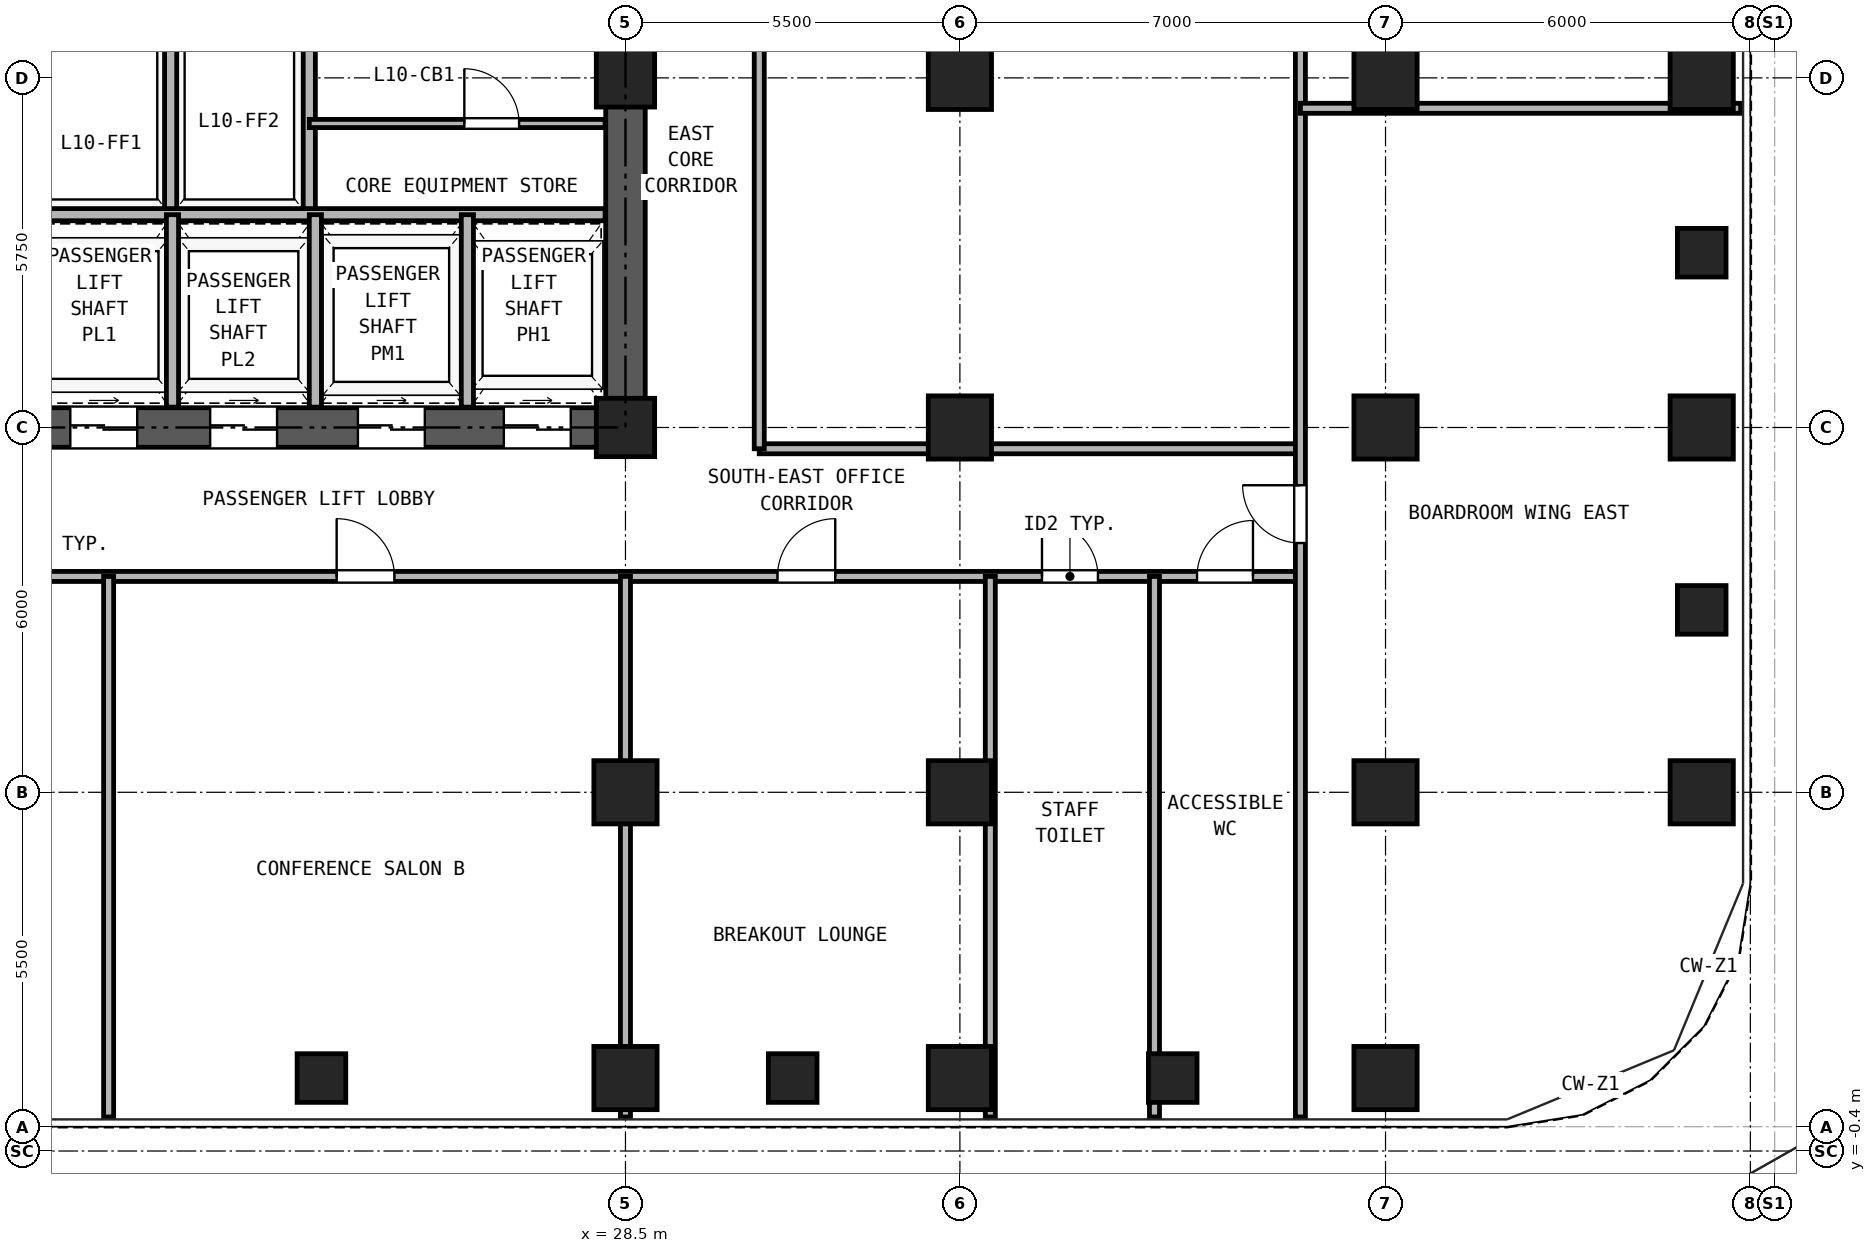
"""IFC4 building model, lengths in metres.
Left out: names, types, materials, properties, quantities, classifications, styles, units other than length and angle.
Written with IfcOpenShell. Run it as: python <this file> out.ifc"""

import sys

from ifc_helpers import new_model, si_unit, direction, frame, frame_2d, origin, origin_2d, place, context, subcontext, project, spatial, rectangle, hollow_rectangle, extrude, source, transform, mapped, element, fill, save


model = new_model("IFC4")
c1 = context("Model", 3, precision=1e-05, world=origin(), true_north=direction((0.0, 1.0)))
c2 = subcontext(c1, "Body", "Model", "MODEL_VIEW")
j1 = project(units=[si_unit("LENGTHUNIT", "METRE"), si_unit("PLANEANGLEUNIT", "RADIAN")], contexts=[c1])
p1 = place(None, origin())
s1 = spatial("IfcSite", under=j1, at=p1, CompositionType="ELEMENT")
p2 = place(p1, origin())
s2 = spatial("IfcBuilding", under=s1, at=p2, CompositionType="ELEMENT")
p3 = place(p2, frame((0.0, 0.0, 40.5)))
s3 = spatial("IfcBuildingStorey", under=s2, at=p3, CompositionType="ELEMENT", Elevation=40.5)
m1 = source(origin(), c2, "Body", "SweptSolid", [
    extrude(hollow_rectangle(XDim=1.04, YDim=1.04, WallThickness=0.065, at=origin_2d()), origin(), (0.0, 0.0, 1.0), 3.32),
])
for number, where, z_axis, x_axis in (
    (1, (28.5, 0.8, 0.0), (0.0, 0.0, 1.0), (1.0, 0.0, 0.0)),
    (2, (34.0, 0.8, 0.0), (0.0, 0.0, 1.0), (1.0, 0.0, 0.0)),
    (3, (41.0, 0.8, 0.0), (0.0, 0.0, 1.0), (1.0, 0.0, 0.0)),
    (4, (46.2, 5.5, 0.0), (0.0, 0.0, 1.0), (1.0, 0.0, 0.0)),
    (5, (46.2, 11.5, 0.0), (0.0, 0.0, 1.0), (1.0, 0.0, 0.0)),
    (6, (46.2, 17.25, 0.0), (0.0, 0.0, 1.0), (1.0, 0.0, 0.0)),
    (7, (28.5, 5.5, 0.0), (0.0, 0.0, 1.0), (1.0, 0.0, 0.0)),
):
    element("IfcColumn", number, at=place(p3, frame(where, z_axis=z_axis, x_axis=x_axis)), inside=s3, PredefinedType="COLUMN", context=c2, shape_type="MappedRepresentation", body=[
        mapped(m1, transform((0.0, 0.0, 0.0), x_axis=(1.0, 0.0, 0.0), y_axis=(0.0, 1.0, 0.0), z_axis=(0.0, 0.0, 1.0), scale=1.0)),
    ])
m2 = source(origin(), c2, "Body", "SweptSolid", [
    extrude(hollow_rectangle(XDim=0.96, YDim=0.96, WallThickness=0.06, at=origin_2d()), origin(), (0.0, 0.0, 1.0), 3.32),
])
for number, where, z_axis, x_axis in (
    (8, (28.5, 11.5, 0.0), (0.0, 0.0, 1.0), (1.0, 0.0, 0.0)),
    (9, (28.5, 17.25, 0.0), (0.0, 0.0, 1.0), (1.0, 0.0, 0.0)),
):
    element("IfcColumn", number, at=place(p3, frame(where, z_axis=z_axis, x_axis=x_axis)), inside=s3, PredefinedType="COLUMN", context=c2, shape_type="MappedRepresentation", body=[
        mapped(m2, transform((0.0, 0.0, 0.0), x_axis=(1.0, 0.0, 0.0), y_axis=(0.0, 1.0, 0.0), z_axis=(0.0, 0.0, 1.0), scale=1.0)),
    ])
for number, where, z_axis, x_axis in (
    (10, (34.0, 5.5, 0.0), (0.0, 0.0, 1.0), (1.0, 0.0, 0.0)),
    (11, (34.0, 11.5, 0.0), (0.0, 0.0, 1.0), (1.0, 0.0, 0.0)),
    (12, (34.0, 17.25, 0.0), (0.0, 0.0, 1.0), (1.0, 0.0, 0.0)),
    (13, (41.0, 5.5, 0.0), (0.0, 0.0, 1.0), (1.0, 0.0, 0.0)),
    (14, (41.0, 11.5, 0.0), (0.0, 0.0, 1.0), (1.0, 0.0, 0.0)),
    (15, (41.0, 17.25, 0.0), (0.0, 0.0, 1.0), (1.0, 0.0, 0.0)),
):
    element("IfcColumn", number, at=place(p3, frame(where, z_axis=z_axis, x_axis=x_axis)), inside=s3, PredefinedType="COLUMN", context=c2, shape_type="MappedRepresentation", body=[
        mapped(m1, transform((0.0, 0.0, 0.0), x_axis=(1.0, 0.0, 0.0), y_axis=(0.0, 1.0, 0.0), z_axis=(0.0, 0.0, 1.0), scale=1.0)),
    ])
m3 = source(origin(), c2, "Body", "SweptSolid", [
    extrude(hollow_rectangle(XDim=0.8, YDim=0.8, WallThickness=0.045, at=origin_2d()), origin(), (0.0, 0.0, 1.0), 3.32),
])
for number, where, z_axis, x_axis in (
    (16, (23.5, 0.8, 0.0), (0.0, 0.0, 1.0), (1.0, 0.0, 0.0)),
    (17, (31.25, 0.8, 0.0), (0.0, 0.0, 1.0), (1.0, 0.0, 0.0)),
    (18, (37.5, 0.8, 0.0), (0.0, 0.0, 1.0), (1.0, 0.0, 0.0)),
    (19, (46.2, 8.5, 0.0), (0.0, 0.0, 1.0), (1.0, 0.0, 0.0)),
    (20, (46.2, 14.375, 0.0), (0.0, 0.0, 1.0), (1.0, 0.0, 0.0)),
):
    element("IfcColumn", number, at=place(p3, frame(where, z_axis=z_axis, x_axis=x_axis)), inside=s3, PredefinedType="COLUMN", context=c2, shape_type="MappedRepresentation", body=[
        mapped(m3, transform((0.0, 0.0, 0.0), x_axis=(1.0, 0.0, 0.0), y_axis=(0.0, 1.0, 0.0), z_axis=(0.0, 0.0, 1.0), scale=1.0)),
    ])
p4 = place(p3, frame((18.175, 11.5, 0.0), z_axis=(0.0, 0.0, 1.0), x_axis=(1.0, 0.0, 0.0)))
e21 = element("IfcWall", 21, at=p4, inside=s3, PredefinedType="SHEAR", context=c2, shape_type="SweptSolid", body=[
    extrude(rectangle(XDim=10.65, YDim=0.65, at=frame_2d((5.325, 0.0))), origin(), (0.0, 0.0, 1.0), 3.32),
])
p5 = place(p4, frame((1.195, 0.0, 0.0)))
e22 = element("IfcOpeningElement", 22, at=p5, cuts=e21, PredefinedType="OPENING", context=c2, shape_type="SweptSolid", body=[
    extrude(rectangle(XDim=1.1, YDim=2.25, at=frame_2d((0.55, 1.125))), frame((0.0, 0.335, 0.0), z_axis=(0.0, -1.0, 0.0), x_axis=(1.0, 0.0, 0.0)), (0.0, 0.0, 1.0), 0.67),
])
p6 = place(p4, frame((3.495, 0.0, 0.0)))
e23 = element("IfcOpeningElement", 23, at=p6, cuts=e21, PredefinedType="OPENING", context=c2, shape_type="SweptSolid", body=[
    extrude(rectangle(XDim=1.1, YDim=2.25, at=frame_2d((0.55, 1.125))), frame((0.0, 0.335, 0.0), z_axis=(0.0, -1.0, 0.0), x_axis=(1.0, 0.0, 0.0)), (0.0, 0.0, 1.0), 0.67),
])
p7 = place(p4, frame((5.925, 0.0, 0.0)))
e24 = element("IfcOpeningElement", 24, at=p7, cuts=e21, PredefinedType="OPENING", context=c2, shape_type="SweptSolid", body=[
    extrude(rectangle(XDim=1.1, YDim=2.25, at=frame_2d((0.55, 1.125))), frame((0.0, 0.335, 0.0), z_axis=(0.0, -1.0, 0.0), x_axis=(1.0, 0.0, 0.0)), (0.0, 0.0, 1.0), 0.67),
])
p8 = place(p4, frame((8.325, 0.0, 0.0)))
e25 = element("IfcOpeningElement", 25, at=p8, cuts=e21, PredefinedType="OPENING", context=c2, shape_type="SweptSolid", body=[
    extrude(rectangle(XDim=1.1, YDim=2.25, at=frame_2d((0.55, 1.125))), frame((0.0, 0.335, 0.0), z_axis=(0.0, -1.0, 0.0), x_axis=(1.0, 0.0, 0.0)), (0.0, 0.0, 1.0), 0.67),
])
p9 = place(p3, frame((28.5, 11.825, 0.0), z_axis=(0.0, 0.0, 1.0), x_axis=(0.0, 1.0, 0.0)))
e26 = element("IfcWall", 26, at=p9, inside=s3, PredefinedType="SHEAR", context=c2, shape_type="SweptSolid", body=[
    extrude(rectangle(XDim=16.6, YDim=0.65, at=frame_2d((8.3, 0.0))), origin(), (0.0, 0.0, 1.0), 3.32),
])
p10 = place(p9, frame((7.325, 0.0, 0.0)))
e27 = element("IfcOpeningElement", 27, at=p10, cuts=e26, PredefinedType="OPENING", context=c2, shape_type="SweptSolid", body=[
    extrude(rectangle(XDim=1.15, YDim=2.2, at=frame_2d((0.575, 1.1))), frame((0.0, 0.335, 0.0), z_axis=(0.0, -1.0, 0.0), x_axis=(1.0, 0.0, 0.0)), (0.0, 0.0, 1.0), 0.67),
])
for number, where, z_axis, x_axis in (
    (28, (21.02, 15.0, 0.0), (0.0, 0.0, 1.0), (0.0, 1.0, 0.0)),
    (29, (23.3, 15.0, 0.0), (0.0, 0.0, 1.0), (0.0, 1.0, 0.0)),
):
    element("IfcWall", number, at=place(p3, frame(where, z_axis=z_axis, x_axis=x_axis)), inside=s3, PredefinedType="PARTITIONING", context=c2, shape_type="SweptSolid", body=[
        extrude(rectangle(XDim=3.0, YDim=0.2, at=frame_2d((1.5, 0.0))), origin(), (0.0, 0.0, 1.0), 3.32),
    ])
p11 = place(p3, frame((18.835, 15.0, 0.0), z_axis=(0.0, 0.0, 1.0), x_axis=(1.0, 0.0, 0.0)))
e30 = element("IfcWall", 30, at=p11, inside=s3, PredefinedType="PARTITIONING", context=c2, shape_type="SweptSolid", body=[
    extrude(rectangle(XDim=9.33, YDim=0.2, at=frame_2d((4.665, 0.0))), origin(), (0.0, 0.0, 1.0), 3.32),
])
p12 = place(p3, frame((23.3, 16.5, 0.0), z_axis=(0.0, 0.0, 1.0), x_axis=(1.0, 0.0, 0.0)))
e31 = element("IfcWall", 31, at=p12, inside=s3, PredefinedType="PARTITIONING", context=c2, shape_type="SweptSolid", body=[
    extrude(rectangle(XDim=4.865, YDim=0.135, at=frame_2d((2.433, 0.0))), origin(), (0.0, 0.0, 1.0), 3.32),
])
p13 = place(p12, frame((2.55, 0.0, 0.0)))
e32 = element("IfcOpeningElement", 32, at=p13, cuts=e31, PredefinedType="OPENING", context=c2, shape_type="SweptSolid", body=[
    extrude(rectangle(XDim=0.9, YDim=2.05, at=frame_2d((0.45, 1.025))), frame((0.0, 0.077, 0.0), z_axis=(0.0, -1.0, 0.0), x_axis=(1.0, 0.0, 0.0)), (0.0, 0.0, 1.0), 0.155),
])
for number, where, z_axis, x_axis in (
    (33, (21.05, 11.835, 0.0), (0.0, 0.0, 1.0), (0.0, 1.0, 0.0)),
    (34, (23.4, 11.835, 0.0), (0.0, 0.0, 1.0), (0.0, 1.0, 0.0)),
    (35, (25.9, 11.835, 0.0), (0.0, 0.0, 1.0), (0.0, 1.0, 0.0)),
):
    element("IfcWall", number, at=place(p3, frame(where, z_axis=z_axis, x_axis=x_axis)), inside=s3, PredefinedType="PARTITIONING", context=c2, shape_type="SweptSolid", body=[
        extrude(rectangle(XDim=3.165, YDim=0.2, at=frame_2d((1.583, 0.0))), origin(), (0.0, 0.0, 1.0), 3.32),
    ])
p14 = place(p3, frame((7.4, 9.05, 0.0), z_axis=(0.0, 0.0, 1.0), x_axis=(1.0, 0.0, 0.0)))
e36 = element("IfcWall", 36, at=p14, inside=s3, PredefinedType="PARTITIONING", context=c2, shape_type="SweptSolid", body=[
    extrude(rectangle(XDim=32.2, YDim=0.165, at=frame_2d((16.1, 0.0))), origin(), (0.0, 0.0, 1.0), 3.32),
])
p15 = place(p14, frame((5.8, 0.0, 0.0)))
e37 = element("IfcOpeningElement", 37, at=p15, cuts=e36, PredefinedType="OPENING", context=c2, shape_type="SweptSolid", body=[
    extrude(rectangle(XDim=0.95, YDim=2.15, at=frame_2d((0.475, 1.075))), frame((0.0, 0.093, 0.0), z_axis=(0.0, -1.0, 0.0), x_axis=(1.0, 0.0, 0.0)), (0.0, 0.0, 1.0), 0.185),
])
p16 = place(p14, frame((16.35, 0.0, 0.0)))
e38 = element("IfcOpeningElement", 38, at=p16, cuts=e36, PredefinedType="OPENING", context=c2, shape_type="SweptSolid", body=[
    extrude(rectangle(XDim=0.95, YDim=2.15, at=frame_2d((0.475, 1.075))), frame((0.0, 0.093, 0.0), z_axis=(0.0, -1.0, 0.0), x_axis=(1.0, 0.0, 0.0)), (0.0, 0.0, 1.0), 0.185),
])
p17 = place(p14, frame((23.6, 0.0, 0.0)))
e39 = element("IfcOpeningElement", 39, at=p17, cuts=e36, PredefinedType="OPENING", context=c2, shape_type="SweptSolid", body=[
    extrude(rectangle(XDim=0.95, YDim=2.15, at=frame_2d((0.475, 1.075))), frame((0.0, 0.093, 0.0), z_axis=(0.0, -1.0, 0.0), x_axis=(1.0, 0.0, 0.0)), (0.0, 0.0, 1.0), 0.185),
])
p18 = place(p14, frame((27.95, 0.0, 0.0)))
e40 = element("IfcOpeningElement", 40, at=p18, cuts=e36, PredefinedType="OPENING", context=c2, shape_type="SweptSolid", body=[
    extrude(rectangle(XDim=0.92, YDim=2.1, at=frame_2d((0.46, 1.05))), frame((0.0, 0.093, 0.0), z_axis=(0.0, -1.0, 0.0), x_axis=(1.0, 0.0, 0.0)), (0.0, 0.0, 1.0), 0.185),
])
p19 = place(p14, frame((30.5, 0.0, 0.0)))
e41 = element("IfcOpeningElement", 41, at=p19, cuts=e36, PredefinedType="OPENING", context=c2, shape_type="SweptSolid", body=[
    extrude(rectangle(XDim=0.92, YDim=2.1, at=frame_2d((0.46, 1.05))), frame((0.0, 0.093, 0.0), z_axis=(0.0, -1.0, 0.0), x_axis=(1.0, 0.0, 0.0)), (0.0, 0.0, 1.0), 0.185),
])
p20 = place(p3, frame((30.7, 11.15, 0.0), z_axis=(0.0, 0.0, 1.0), x_axis=(1.0, 0.0, 0.0)))
e42 = element("IfcWall", 42, at=p20, inside=s3, PredefinedType="PARTITIONING", context=c2, shape_type="SweptSolid", body=[
    extrude(rectangle(XDim=8.9, YDim=0.165, at=frame_2d((4.45, 0.0))), origin(), (0.0, 0.0, 1.0), 3.32),
])
p21 = place(p3, frame((30.7, 11.15, 0.0), z_axis=(0.0, 0.0, 1.0), x_axis=(0.0, 1.0, 0.0)))
e43 = element("IfcWall", 43, at=p21, inside=s3, PredefinedType="PARTITIONING", context=c2, shape_type="SweptSolid", body=[
    extrude(rectangle(XDim=18.25, YDim=0.165, at=frame_2d((9.125, 0.0))), origin(), (0.0, 0.0, 1.0), 3.32),
])
p22 = place(p21, frame((8.625, 0.0, 0.0)))
e44 = element("IfcOpeningElement", 44, at=p22, cuts=e43, PredefinedType="OPENING", context=c2, shape_type="SweptSolid", body=[
    extrude(rectangle(XDim=0.95, YDim=2.15, at=frame_2d((0.475, 1.075))), frame((0.0, 0.093, 0.0), z_axis=(0.0, -1.0, 0.0), x_axis=(1.0, 0.0, 0.0)), (0.0, 0.0, 1.0), 0.185),
])
p23 = place(p3, frame((39.6, 0.16, 0.0), z_axis=(0.0, 0.0, 1.0), x_axis=(0.0, 1.0, 0.0)))
e45 = element("IfcWall", 45, at=p23, inside=s3, PredefinedType="PARTITIONING", context=c2, shape_type="SweptSolid", body=[
    extrude(rectangle(XDim=40.18, YDim=0.165, at=frame_2d((20.09, 0.0))), origin(), (0.0, 0.0, 1.0), 3.32),
])
p24 = place(p23, frame((9.44, 0.0, 0.0)))
e46 = element("IfcOpeningElement", 46, at=p24, cuts=e45, PredefinedType="OPENING", context=c2, shape_type="SweptSolid", body=[
    extrude(rectangle(XDim=0.95, YDim=2.15, at=frame_2d((0.475, 1.075))), frame((0.0, 0.093, 0.0), z_axis=(0.0, -1.0, 0.0), x_axis=(1.0, 0.0, 0.0)), (0.0, 0.0, 1.0), 0.185),
])
p25 = place(p23, frame((29.79, 0.0, 0.0)))
e47 = element("IfcOpeningElement", 47, at=p25, cuts=e45, PredefinedType="OPENING", context=c2, shape_type="SweptSolid", body=[
    extrude(rectangle(XDim=0.95, YDim=2.15, at=frame_2d((0.475, 1.075))), frame((0.0, 0.093, 0.0), z_axis=(0.0, -1.0, 0.0), x_axis=(1.0, 0.0, 0.0)), (0.0, 0.0, 1.0), 0.185),
])
p26 = place(p3, frame((20.0, 0.16, 0.0), z_axis=(0.0, 0.0, 1.0), x_axis=(0.0, 1.0, 0.0)))
e48 = element("IfcWall", 48, at=p26, inside=s3, PredefinedType="PARTITIONING", context=c2, shape_type="SweptSolid", body=[
    extrude(rectangle(XDim=8.89, YDim=0.165, at=frame_2d((4.445, 0.0))), origin(), (0.0, 0.0, 1.0), 3.32),
])
p27 = place(p3, frame((28.5, 0.16, 0.0), z_axis=(0.0, 0.0, 1.0), x_axis=(0.0, 1.0, 0.0)))
e49 = element("IfcWall", 49, at=p27, inside=s3, PredefinedType="PARTITIONING", context=c2, shape_type="SweptSolid", body=[
    extrude(rectangle(XDim=8.89, YDim=0.165, at=frame_2d((4.445, 0.0))), origin(), (0.0, 0.0, 1.0), 2.539),
])
for number, where, z_axis, x_axis in (
    (50, (34.5, 0.16, 0.0), (0.0, 0.0, 1.0), (0.0, 1.0, 0.0)),
    (51, (37.2, 0.16, 0.0), (0.0, 0.0, 1.0), (0.0, 1.0, 0.0)),
):
    element("IfcWall", number, at=place(p3, frame(where, z_axis=z_axis, x_axis=x_axis)), inside=s3, PredefinedType="PARTITIONING", context=c2, shape_type="SweptSolid", body=[
        extrude(rectangle(XDim=8.89, YDim=0.165, at=frame_2d((4.445, 0.0))), origin(), (0.0, 0.0, 1.0), 3.32),
    ])
p28 = place(p3, frame((39.6, 16.75, 0.0), z_axis=(0.0, 0.0, 1.0), x_axis=(1.0, 0.0, 0.0)))
e52 = element("IfcWall", 52, at=p28, inside=s3, PredefinedType="PARTITIONING", context=c2, shape_type="SweptSolid", body=[
    extrude(rectangle(XDim=7.24, YDim=0.165, at=frame_2d((3.62, 0.0))), origin(), (0.0, 0.0, 1.0), 3.32),
])
p29 = place(p13, frame((0.9, 0.0, 0.0), z_axis=(0.0, 0.0, 1.0), x_axis=(-1.0, 0.0, 0.0)))
e53 = element("IfcDoor", 53, at=p29, inside=s3, OperationType="SINGLE_SWING_LEFT", PredefinedType="DOOR", context=c2, shape_type="SweptSolid", body=[
    extrude(rectangle(XDim=0.9, YDim=2.05, at=frame_2d((0.45, 1.025))), frame((0.0, 0.025, 0.0), z_axis=(0.0, -1.0, 0.0), x_axis=(1.0, 0.0, 0.0)), (0.0, 0.0, 1.0), 0.05),
])
fill(e32, e53)
p30 = place(p5, frame((1.1, 0.0, 0.0), z_axis=(0.0, 0.0, 1.0), x_axis=(-1.0, 0.0, 0.0)))
e54 = element("IfcDoor", 54, at=p30, inside=s3, OperationType="DOUBLE_DOOR_SLIDING", PredefinedType="DOOR", context=c2, shape_type="SweptSolid", body=[
    extrude(rectangle(XDim=1.1, YDim=2.25, at=frame_2d((0.55, 1.125))), frame((0.0, 0.025, 0.0), z_axis=(0.0, -1.0, 0.0), x_axis=(1.0, 0.0, 0.0)), (0.0, 0.0, 1.0), 0.05),
])
fill(e22, e54)
p31 = place(p6, frame((1.1, 0.0, 0.0), z_axis=(0.0, 0.0, 1.0), x_axis=(-1.0, 0.0, 0.0)))
e55 = element("IfcDoor", 55, at=p31, inside=s3, OperationType="DOUBLE_DOOR_SLIDING", PredefinedType="DOOR", context=c2, shape_type="SweptSolid", body=[
    extrude(rectangle(XDim=1.1, YDim=2.25, at=frame_2d((0.55, 1.125))), frame((0.0, 0.025, 0.0), z_axis=(0.0, -1.0, 0.0), x_axis=(1.0, 0.0, 0.0)), (0.0, 0.0, 1.0), 0.05),
])
fill(e23, e55)
p32 = place(p7, frame((1.1, 0.0, 0.0), z_axis=(0.0, 0.0, 1.0), x_axis=(-1.0, 0.0, 0.0)))
e56 = element("IfcDoor", 56, at=p32, inside=s3, OperationType="DOUBLE_DOOR_SLIDING", PredefinedType="DOOR", context=c2, shape_type="SweptSolid", body=[
    extrude(rectangle(XDim=1.1, YDim=2.25, at=frame_2d((0.55, 1.125))), frame((0.0, 0.025, 0.0), z_axis=(0.0, -1.0, 0.0), x_axis=(1.0, 0.0, 0.0)), (0.0, 0.0, 1.0), 0.05),
])
fill(e24, e56)
p33 = place(p8, frame((1.1, 0.0, 0.0), z_axis=(0.0, 0.0, 1.0), x_axis=(-1.0, 0.0, 0.0)))
e57 = element("IfcDoor", 57, at=p33, inside=s3, OperationType="DOUBLE_DOOR_SLIDING", PredefinedType="DOOR", context=c2, shape_type="SweptSolid", body=[
    extrude(rectangle(XDim=1.1, YDim=2.25, at=frame_2d((0.55, 1.125))), frame((0.0, 0.025, 0.0), z_axis=(0.0, -1.0, 0.0), x_axis=(1.0, 0.0, 0.0)), (0.0, 0.0, 1.0), 0.05),
])
fill(e25, e57)
p34 = place(p16, frame((0.95, 0.0, 0.0), z_axis=(0.0, 0.0, 1.0), x_axis=(-1.0, 0.0, 0.0)))
e58 = element("IfcDoor", 58, at=p34, inside=s3, OperationType="SINGLE_SWING_LEFT", PredefinedType="DOOR", context=c2, shape_type="SweptSolid", body=[
    extrude(rectangle(XDim=0.95, YDim=2.15, at=frame_2d((0.475, 1.075))), frame((0.0, 0.025, 0.0), z_axis=(0.0, -1.0, 0.0), x_axis=(1.0, 0.0, 0.0)), (0.0, 0.0, 1.0), 0.05),
])
fill(e38, e58)
p35 = place(p17, frame((0.95, 0.0, 0.0), z_axis=(0.0, 0.0, 1.0), x_axis=(-1.0, 0.0, 0.0)))
e59 = element("IfcDoor", 59, at=p35, inside=s3, OperationType="SINGLE_SWING_RIGHT", PredefinedType="DOOR", context=c2, shape_type="SweptSolid", body=[
    extrude(rectangle(XDim=0.95, YDim=2.15, at=frame_2d((0.475, 1.075))), frame((0.0, 0.025, 0.0), z_axis=(0.0, -1.0, 0.0), x_axis=(1.0, 0.0, 0.0)), (0.0, 0.0, 1.0), 0.05),
])
fill(e39, e59)
p36 = place(p18, frame((0.92, 0.0, 0.0), z_axis=(0.0, 0.0, 1.0), x_axis=(-1.0, 0.0, 0.0)))
e60 = element("IfcDoor", 60, at=p36, inside=s3, OperationType="SINGLE_SWING_LEFT", PredefinedType="DOOR", context=c2, shape_type="SweptSolid", body=[
    extrude(rectangle(XDim=0.92, YDim=2.1, at=frame_2d((0.46, 1.05))), frame((0.0, 0.025, 0.0), z_axis=(0.0, -1.0, 0.0), x_axis=(1.0, 0.0, 0.0)), (0.0, 0.0, 1.0), 0.05),
])
fill(e40, e60)
p37 = place(p19, frame((0.92, 0.0, 0.0), z_axis=(0.0, 0.0, 1.0), x_axis=(-1.0, 0.0, 0.0)))
e61 = element("IfcDoor", 61, at=p37, inside=s3, OperationType="SINGLE_SWING_RIGHT", PredefinedType="DOOR", context=c2, shape_type="SweptSolid", body=[
    extrude(rectangle(XDim=0.92, YDim=2.1, at=frame_2d((0.46, 1.05))), frame((0.0, 0.025, 0.0), z_axis=(0.0, -1.0, 0.0), x_axis=(1.0, 0.0, 0.0)), (0.0, 0.0, 1.0), 0.05),
])
fill(e41, e61)
p38 = place(p24, origin())
e62 = element("IfcDoor", 62, at=p38, inside=s3, OperationType="SINGLE_SWING_RIGHT", PredefinedType="DOOR", context=c2, shape_type="SweptSolid", body=[
    extrude(rectangle(XDim=0.95, YDim=2.15, at=frame_2d((0.475, 1.075))), frame((0.0, 0.025, 0.0), z_axis=(0.0, -1.0, 0.0), x_axis=(1.0, 0.0, 0.0)), (0.0, 0.0, 1.0), 0.05),
])
fill(e46, e62)
save(model, sys.argv[1])
